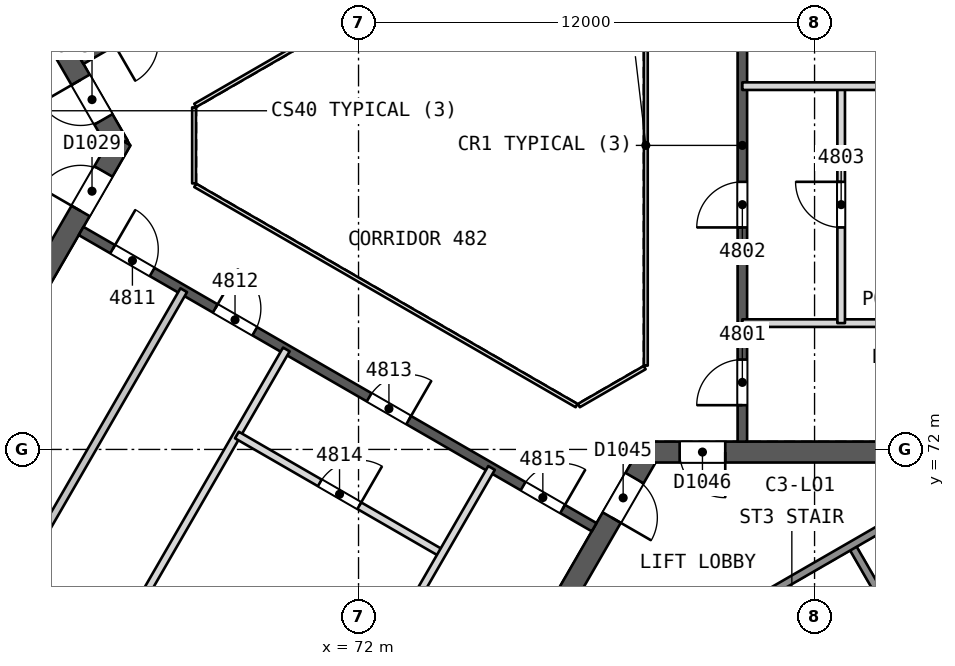
"""IFC4 building model, lengths in metres.
Left out: names, types, materials, properties, quantities, classifications, styles, units other than length and angle.
Written with IfcOpenShell. Run it as: python <this file> out.ifc"""

import sys

from ifc_helpers import new_model, si_unit, direction, frame, frame_2d, origin, place, context, subcontext, project, spatial, rectangle, extrude, element, fill, save


model = new_model("IFC4")
c1 = context("Model", 3, precision=1e-05, world=origin(), true_north=direction((0.0, 1.0)))
c2 = subcontext(c1, "Body", "Model", "MODEL_VIEW")
j1 = project(units=[si_unit("LENGTHUNIT", "METRE"), si_unit("PLANEANGLEUNIT", "RADIAN")], contexts=[c1])
p1 = place(None, origin())
s1 = spatial("IfcSite", under=j1, at=p1, CompositionType="ELEMENT")
p2 = place(p1, origin())
s2 = spatial("IfcBuilding", under=s1, at=p2, CompositionType="ELEMENT")
p3 = place(p2, frame((0.0, 0.0, 197.0)))
s3 = spatial("IfcBuildingStorey", under=s2, at=p3, CompositionType="ELEMENT", Elevation=197.0)
p4 = place(p3, frame((65.682, 80.0, 0.0), z_axis=(0.0, 0.0, 1.0), x_axis=(-0.500000202252, 0.866025287014, 0.0)))
e1 = element("IfcWall", 1, at=p4, inside=s3, PredefinedType="SHEAR", context=c2, shape_type="SweptSolid", body=[
    extrude(rectangle(XDim=10.221, YDim=0.55, at=frame_2d((5.111, 0.0))), origin(), (0.0, 0.0, 1.0), 4.4),
])
p5 = place(p4, frame((0.791, 0.0, 0.0)))
e2 = element("IfcOpeningElement", 2, at=p5, cuts=e1, PredefinedType="OPENING", context=c2, shape_type="SweptSolid", body=[
    extrude(rectangle(XDim=1.2, YDim=2.1, at=frame_2d((0.6, 1.05))), frame((0.0, 0.286, 0.0), z_axis=(0.0, -1.0, 0.0), x_axis=(1.0, 0.0, 0.0)), (0.0, 0.0, 1.0), 0.571),
])
p6 = place(p3, frame((60.709, 71.386, 0.0), z_axis=(0.0, 0.0, 1.0), x_axis=(0.500015938302, 0.866016201606, 0.0)))
e3 = element("IfcWall", 3, at=p6, inside=s3, PredefinedType="SHEAR", context=c2, shape_type="SweptSolid", body=[
    extrude(rectangle(XDim=10.105, YDim=0.55, at=frame_2d((5.053, 0.0))), origin(), (0.0, 0.0, 1.0), 4.4),
])
p7 = place(p6, frame((7.955, 0.0, 0.0)))
e4 = element("IfcOpeningElement", 4, at=p7, cuts=e3, PredefinedType="OPENING", context=c2, shape_type="SweptSolid", body=[
    extrude(rectangle(XDim=1.2, YDim=2.1, at=frame_2d((0.6, 1.05))), frame((0.0, 0.286, 0.0), z_axis=(0.0, -1.0, 0.0), x_axis=(1.0, 0.0, 0.0)), (0.0, 0.0, 1.0), 0.571),
])
p8 = place(p3, frame((79.659, 71.931, 0.0), z_axis=(0.0, 0.0, 1.0), x_axis=(-0.500000202252, -0.866025287014, 0.0)))
e5 = element("IfcWall", 5, at=p8, inside=s3, PredefinedType="SHEAR", context=c2, shape_type="SweptSolid", body=[
    extrude(rectangle(XDim=10.221, YDim=0.55, at=frame_2d((5.111, 0.0))), origin(), (0.0, 0.0, 1.0), 4.4),
])
p9 = place(p8, frame((0.791, 0.0, 0.0)))
e6 = element("IfcOpeningElement", 6, at=p9, cuts=e5, PredefinedType="OPENING", context=c2, shape_type="SweptSolid", body=[
    extrude(rectangle(XDim=1.2, YDim=2.1, at=frame_2d((0.6, 1.05))), frame((0.0, 0.286, 0.0), z_axis=(0.0, -1.0, 0.0), x_axis=(1.0, 0.0, 0.0)), (0.0, 0.0, 1.0), 0.571),
])
p10 = place(p3, frame((89.605, 71.931, 0.0), z_axis=(0.0, 0.0, 1.0), x_axis=(-1.0, 0.0, 0.0)))
e7 = element("IfcWall", 7, at=p10, inside=s3, PredefinedType="SHEAR", context=c2, shape_type="SweptSolid", body=[
    extrude(rectangle(XDim=10.105, YDim=0.55, at=frame_2d((5.052, 0.0))), origin(), (0.0, 0.0, 1.0), 4.4),
])
p11 = place(p10, frame((7.955, 0.0, 0.0)))
e8 = element("IfcOpeningElement", 8, at=p11, cuts=e7, PredefinedType="OPENING", context=c2, shape_type="SweptSolid", body=[
    extrude(rectangle(XDim=1.2, YDim=2.1, at=frame_2d((0.6, 1.05))), frame((0.0, 0.286, 0.0), z_axis=(0.0, -1.0, 0.0), x_axis=(1.0, 0.0, 0.0)), (0.0, 0.0, 1.0), 0.571),
])
p12 = place(p3, frame((82.1, 72.206, 0.0), z_axis=(0.0, 0.0, 1.0), x_axis=(0.0, 1.0, 0.0)))
e9 = element("IfcWall", 9, at=p12, inside=s3, PredefinedType="SHEAR", context=c2, shape_type="SweptSolid", body=[
    extrude(rectangle(XDim=15.588, YDim=0.25, at=frame_2d((7.794, 0.0))), origin(), (0.0, 0.0, 1.0), 3.95),
])
p13 = place(p12, frame((0.959, 0.0, 0.0)))
e10 = element("IfcOpeningElement", 10, at=p13, cuts=e9, PredefinedType="OPENING", context=c2, shape_type="SweptSolid", body=[
    extrude(rectangle(XDim=1.2, YDim=2.4, at=frame_2d((0.6, 1.2))), frame((0.0, 0.135, 0.0), z_axis=(0.0, -1.0, 0.0), x_axis=(1.0, 0.0, 0.0)), (0.0, 0.0, 1.0), 0.271),
])
p14 = place(p12, frame((5.635, 0.0, 0.0)))
e11 = element("IfcOpeningElement", 11, at=p14, cuts=e9, PredefinedType="OPENING", context=c2, shape_type="SweptSolid", body=[
    extrude(rectangle(XDim=1.2, YDim=2.4, at=frame_2d((0.6, 1.2))), frame((0.0, 0.135, 0.0), z_axis=(0.0, -1.0, 0.0), x_axis=(1.0, 0.0, 0.0)), (0.0, 0.0, 1.0), 0.271),
])
p15 = place(p12, frame((10.312, 0.0, 0.0)))
e12 = element("IfcOpeningElement", 12, at=p15, cuts=e9, PredefinedType="OPENING", context=c2, shape_type="SweptSolid", body=[
    extrude(rectangle(XDim=1.2, YDim=2.4, at=frame_2d((0.6, 1.2))), frame((0.0, 0.135, 0.0), z_axis=(0.0, -1.0, 0.0), x_axis=(1.0, 0.0, 0.0)), (0.0, 0.0, 1.0), 0.271),
])
p16 = place(p12, frame((13.43, 0.0, 0.0)))
e13 = element("IfcOpeningElement", 13, at=p16, cuts=e9, PredefinedType="OPENING", context=c2, shape_type="SweptSolid", body=[
    extrude(rectangle(XDim=1.2, YDim=2.4, at=frame_2d((0.6, 1.2))), frame((0.0, 0.135, 0.0), z_axis=(0.0, -1.0, 0.0), x_axis=(1.0, 0.0, 0.0)), (0.0, 0.0, 1.0), 0.271),
])
p17 = place(p3, frame((78.2, 90.046, 0.0), z_axis=(0.0, 0.0, 1.0), x_axis=(-0.866026492143, -0.499998114903, 0.0)))
e14 = element("IfcWall", 14, at=p17, inside=s3, PredefinedType="SHEAR", context=c2, shape_type="SweptSolid", body=[
    extrude(rectangle(XDim=15.588, YDim=0.25, at=frame_2d((7.794, 0.0))), origin(), (0.0, 0.0, 1.0), 3.95),
])
p18 = place(p17, frame((2.518, 0.0, 0.0)))
e15 = element("IfcOpeningElement", 15, at=p18, cuts=e14, PredefinedType="OPENING", context=c2, shape_type="SweptSolid", body=[
    extrude(rectangle(XDim=1.2, YDim=2.4, at=frame_2d((0.6, 1.2))), frame((0.0, 0.135, 0.0), z_axis=(0.0, -1.0, 0.0), x_axis=(1.0, 0.0, 0.0)), (0.0, 0.0, 1.0), 0.271),
])
p19 = place(p17, frame((7.194, 0.0, 0.0)))
e16 = element("IfcOpeningElement", 16, at=p19, cuts=e14, PredefinedType="OPENING", context=c2, shape_type="SweptSolid", body=[
    extrude(rectangle(XDim=1.2, YDim=2.4, at=frame_2d((0.6, 1.2))), frame((0.0, 0.135, 0.0), z_axis=(0.0, -1.0, 0.0), x_axis=(1.0, 0.0, 0.0)), (0.0, 0.0, 1.0), 0.271),
])
p20 = place(p17, frame((10.312, 0.0, 0.0)))
e17 = element("IfcOpeningElement", 17, at=p20, cuts=e14, PredefinedType="OPENING", context=c2, shape_type="SweptSolid", body=[
    extrude(rectangle(XDim=1.2, YDim=2.4, at=frame_2d((0.6, 1.2))), frame((0.0, 0.135, 0.0), z_axis=(0.0, -1.0, 0.0), x_axis=(1.0, 0.0, 0.0)), (0.0, 0.0, 1.0), 0.271),
])
p21 = place(p17, frame((13.43, 0.0, 0.0)))
e18 = element("IfcOpeningElement", 18, at=p21, cuts=e14, PredefinedType="OPENING", context=c2, shape_type="SweptSolid", body=[
    extrude(rectangle(XDim=1.2, YDim=2.4, at=frame_2d((0.6, 1.2))), frame((0.0, 0.135, 0.0), z_axis=(0.0, -1.0, 0.0), x_axis=(1.0, 0.0, 0.0)), (0.0, 0.0, 1.0), 0.271),
])
p22 = place(p3, frame((64.7, 77.748, 0.0), z_axis=(0.0, 0.0, 1.0), x_axis=(0.866026492143, -0.499998114903, 0.0)))
e19 = element("IfcWall", 19, at=p22, inside=s3, PredefinedType="SHEAR", context=c2, shape_type="SweptSolid", body=[
    extrude(rectangle(XDim=15.588, YDim=0.25, at=frame_2d((7.794, 0.0))), origin(), (0.0, 0.0, 1.0), 3.95),
])
p23 = place(p22, frame((0.959, 0.0, 0.0)))
e20 = element("IfcOpeningElement", 20, at=p23, cuts=e19, PredefinedType="OPENING", context=c2, shape_type="SweptSolid", body=[
    extrude(rectangle(XDim=1.2, YDim=2.4, at=frame_2d((0.6, 1.2))), frame((0.0, 0.135, 0.0), z_axis=(0.0, -1.0, 0.0), x_axis=(1.0, 0.0, 0.0)), (0.0, 0.0, 1.0), 0.271),
])
p24 = place(p22, frame((4.076, 0.0, 0.0)))
e21 = element("IfcOpeningElement", 21, at=p24, cuts=e19, PredefinedType="OPENING", context=c2, shape_type="SweptSolid", body=[
    extrude(rectangle(XDim=1.2, YDim=2.4, at=frame_2d((0.6, 1.2))), frame((0.0, 0.135, 0.0), z_axis=(0.0, -1.0, 0.0), x_axis=(1.0, 0.0, 0.0)), (0.0, 0.0, 1.0), 0.271),
])
p25 = place(p22, frame((8.753, 0.0, 0.0)))
e22 = element("IfcOpeningElement", 22, at=p25, cuts=e19, PredefinedType="OPENING", context=c2, shape_type="SweptSolid", body=[
    extrude(rectangle(XDim=1.2, YDim=2.4, at=frame_2d((0.6, 1.2))), frame((0.0, 0.135, 0.0), z_axis=(0.0, -1.0, 0.0), x_axis=(1.0, 0.0, 0.0)), (0.0, 0.0, 1.0), 0.271),
])
p26 = place(p22, frame((13.43, 0.0, 0.0)))
e23 = element("IfcOpeningElement", 23, at=p26, cuts=e19, PredefinedType="OPENING", context=c2, shape_type="SweptSolid", body=[
    extrude(rectangle(XDim=1.2, YDim=2.4, at=frame_2d((0.6, 1.2))), frame((0.0, 0.135, 0.0), z_axis=(0.0, -1.0, 0.0), x_axis=(1.0, 0.0, 0.0)), (0.0, 0.0, 1.0), 0.271),
])
p27 = place(p3, frame((92.979, 75.323, 0.0), z_axis=(0.0, 0.0, 1.0), x_axis=(-1.0, 0.0, 0.0)))
e24 = element("IfcWall", 24, at=p27, inside=s3, PredefinedType="PARTITIONING", context=c2, shape_type="SweptSolid", body=[
    extrude(rectangle(XDim=10.879, YDim=0.2, at=frame_2d((5.44, 0.0))), origin(), (0.0, 0.0, 1.0), 3.95),
])
p28 = place(p3, frame((84.7, 75.323, 0.0), z_axis=(0.0, 0.0, 1.0), x_axis=(0.0, 1.0, 0.0)))
e25 = element("IfcWall", 25, at=p28, inside=s3, PredefinedType="PARTITIONING", context=c2, shape_type="SweptSolid", body=[
    extrude(rectangle(XDim=6.235, YDim=0.2, at=frame_2d((3.118, 0.0))), origin(), (0.0, 0.0, 1.0), 3.95),
])
p29 = place(p28, frame((2.518, 0.0, 0.0)))
e26 = element("IfcOpeningElement", 26, at=p29, cuts=e25, PredefinedType="OPENING", context=c2, shape_type="SweptSolid", body=[
    extrude(rectangle(XDim=1.2, YDim=2.4, at=frame_2d((0.6, 1.2))), frame((0.0, 0.11, 0.0), z_axis=(0.0, -1.0, 0.0), x_axis=(1.0, 0.0, 0.0)), (0.0, 0.0, 1.0), 0.221),
])
for number, where, z_axis, x_axis in (
    (27, (92.979, 81.559, 0.0), (0.0, 0.0, 1.0), (-1.0, 0.0, 0.0)),
    (28, (61.96, 66.768, 0.0), (0.0, 0.0, 1.0), (0.5, 0.866, 0.0)),
):
    element("IfcWall", number, at=place(p3, frame(where, z_axis=z_axis, x_axis=x_axis)), inside=s3, PredefinedType="PARTITIONING", context=c2, shape_type="SweptSolid", body=[
        extrude(rectangle(XDim=10.879, YDim=0.2, at=frame_2d((5.44, 0.0))), origin(), (0.0, 0.0, 1.0), 3.95),
    ])
p30 = place(p3, frame((64.66, 65.209, 0.0), z_axis=(0.0, 0.0, 1.0), x_axis=(0.500015120401, 0.866016673841, 0.0)))
e29 = element("IfcWall", 29, at=p30, inside=s3, PredefinedType="PARTITIONING", context=c2, shape_type="SweptSolid", body=[
    extrude(rectangle(XDim=10.88, YDim=0.2, at=frame_2d((5.44, 0.0))), origin(), (0.0, 0.0, 1.0), 3.95),
])
p31 = place(p3, frame((68.8, 72.379, 0.0), z_axis=(0.0, 0.0, 1.0), x_axis=(0.866022576681, -0.500004896655, 0.0)))
e30 = element("IfcWall", 30, at=p31, inside=s3, PredefinedType="PARTITIONING", context=c2, shape_type="SweptSolid", body=[
    extrude(rectangle(XDim=6.235, YDim=0.2, at=frame_2d((3.118, 0.0))), origin(), (0.0, 0.0, 1.0), 3.95),
])
p32 = place(p31, frame((2.518, 0.0, 0.0)))
e31 = element("IfcOpeningElement", 31, at=p32, cuts=e30, PredefinedType="OPENING", context=c2, shape_type="SweptSolid", body=[
    extrude(rectangle(XDim=1.2, YDim=2.4, at=frame_2d((0.6, 1.2))), frame((0.0, 0.11, 0.0), z_axis=(0.0, -1.0, 0.0), x_axis=(1.0, 0.0, 0.0)), (0.0, 0.0, 1.0), 0.221),
])
p33 = place(p3, frame((70.06, 62.091, 0.0), z_axis=(0.0, 0.0, 1.0), x_axis=(0.49999829022, 0.866026390924, 0.0)))
e32 = element("IfcWall", 32, at=p33, inside=s3, PredefinedType="PARTITIONING", context=c2, shape_type="SweptSolid", body=[
    extrude(rectangle(XDim=10.879, YDim=0.2, at=frame_2d((5.44, 0.0))), origin(), (0.0, 0.0, 1.0), 3.95),
])
p34 = place(p3, frame((88.51, 51.267, 0.0), z_axis=(0.0, 0.0, 1.0), x_axis=(-0.866025243948, 0.500000276845, 0.0)))
e33 = element("IfcWall", 33, at=p34, inside=s3, PredefinedType="SOLIDWALL", context=c2, shape_type="SweptSolid", body=[
    extrude(rectangle(XDim=52.132, YDim=0.3, at=frame_2d((26.066, 0.0))), origin(), (0.0, 0.0, 1.0), 3.95),
])
p35 = place(p34, frame((42.139, 0.0, 0.9)))
e34 = element("IfcOpeningElement", 34, at=p35, cuts=e33, PredefinedType="OPENING", context=c2, shape_type="SweptSolid", body=[
    extrude(rectangle(XDim=1.8, YDim=1.5, at=frame_2d((0.9, 0.75))), frame((0.0, 0.161, 0.0), z_axis=(0.0, -1.0, 0.0), x_axis=(1.0, 0.0, 0.0)), (0.0, 0.0, 1.0), 0.321),
])
p36 = place(p34, frame((8.193, 0.0, 0.9)))
e35 = element("IfcOpeningElement", 35, at=p36, cuts=e33, PredefinedType="OPENING", context=c2, shape_type="SweptSolid", body=[
    extrude(rectangle(XDim=1.8, YDim=1.5, at=frame_2d((0.9, 0.75))), frame((0.0, 0.161, 0.0), z_axis=(0.0, -1.0, 0.0), x_axis=(1.0, 0.0, 0.0)), (0.0, 0.0, 1.0), 0.321),
])
p37 = place(p34, frame((3.713, 0.0, 0.6)))
e36 = element("IfcOpeningElement", 36, at=p37, cuts=e33, PredefinedType="OPENING", context=c2, shape_type="SweptSolid", body=[
    extrude(rectangle(XDim=3.0, YDim=2.4, at=frame_2d((1.5, 1.2))), frame((0.0, 0.161, 0.0), z_axis=(0.0, -1.0, 0.0), x_axis=(1.0, 0.0, 0.0)), (0.0, 0.0, 1.0), 0.321),
])
p38 = place(p34, frame((14.14, 0.0, 0.6)))
e37 = element("IfcOpeningElement", 37, at=p38, cuts=e33, PredefinedType="OPENING", context=c2, shape_type="SweptSolid", body=[
    extrude(rectangle(XDim=3.0, YDim=2.4, at=frame_2d((1.5, 1.2))), frame((0.0, 0.161, 0.0), z_axis=(0.0, -1.0, 0.0), x_axis=(1.0, 0.0, 0.0)), (0.0, 0.0, 1.0), 0.321),
])
p39 = place(p34, frame((24.566, 0.0, 0.6)))
e38 = element("IfcOpeningElement", 38, at=p39, cuts=e33, PredefinedType="OPENING", context=c2, shape_type="SweptSolid", body=[
    extrude(rectangle(XDim=3.0, YDim=2.4, at=frame_2d((1.5, 1.2))), frame((0.0, 0.161, 0.0), z_axis=(0.0, -1.0, 0.0), x_axis=(1.0, 0.0, 0.0)), (0.0, 0.0, 1.0), 0.321),
])
p40 = place(p34, frame((34.992, 0.0, 0.6)))
e39 = element("IfcOpeningElement", 39, at=p40, cuts=e33, PredefinedType="OPENING", context=c2, shape_type="SweptSolid", body=[
    extrude(rectangle(XDim=3.0, YDim=2.4, at=frame_2d((1.5, 1.2))), frame((0.0, 0.161, 0.0), z_axis=(0.0, -1.0, 0.0), x_axis=(1.0, 0.0, 0.0)), (0.0, 0.0, 1.0), 0.321),
])
p41 = place(p34, frame((45.419, 0.0, 0.6)))
e40 = element("IfcOpeningElement", 40, at=p41, cuts=e33, PredefinedType="OPENING", context=c2, shape_type="SweptSolid", body=[
    extrude(rectangle(XDim=3.0, YDim=2.4, at=frame_2d((1.5, 1.2))), frame((0.0, 0.161, 0.0), z_axis=(0.0, -1.0, 0.0), x_axis=(1.0, 0.0, 0.0)), (0.0, 0.0, 1.0), 0.321),
])
p42 = place(p3, frame((83.024, 68.352, 0.0), z_axis=(0.0, 0.0, 1.0), x_axis=(0.50000366821, -0.866023285932, 0.0)))
e41 = element("IfcWall", 41, at=p42, inside=s3, PredefinedType="SOLIDWALL", context=c2, shape_type="SweptSolid", body=[
    extrude(rectangle(XDim=2.48, YDim=0.2, at=frame_2d((1.24, 0.0))), origin(), (0.0, 0.0, 1.0), 3.95),
])
p43 = place(p3, frame((84.973, 69.477, 0.0), z_axis=(0.0, 0.0, 1.0), x_axis=(0.499996545922, -0.866027397988, 0.0)))
e42 = element("IfcWall", 42, at=p43, inside=s3, PredefinedType="SOLIDWALL", context=c2, shape_type="SweptSolid", body=[
    extrude(rectangle(XDim=2.75, YDim=0.2, at=frame_2d((1.375, 0.0))), origin(), (0.0, 0.0, 1.0), 3.95),
])
p44 = place(p3, frame((77.135, 64.952, 0.0), z_axis=(0.0, 0.0, 1.0), x_axis=(0.866031916153, 0.499988720078, 0.0)))
e43 = element("IfcWall", 43, at=p44, inside=s3, PredefinedType="SOLIDWALL", context=c2, shape_type="SweptSolid", body=[
    extrude(rectangle(XDim=11.35, YDim=0.2, at=frame_2d((5.675, 0.0))), origin(), (0.0, 0.0, 1.0), 3.95),
])
for number, where, z_axis, x_axis in (
    (44, (79.56, 74.206, 0.0), (0.0, 0.0, 1.0), (0.0, 1.0, 0.0)),
    (45, (77.738, 86.846, 0.0), (0.0, 0.0, 1.0), (-0.866, -0.5, 0.0)),
):
    element("IfcWall", number, at=place(p3, frame(where, z_axis=z_axis, x_axis=x_axis)), inside=s3, PredefinedType="PARTITIONING", context=c2, shape_type="SweptSolid", body=[
        extrude(rectangle(XDim=11.588, YDim=0.1, at=frame_2d((5.794, 0.0))), origin(), (0.0, 0.0, 1.0), 3.95),
    ])
p45 = place(p3, frame((67.672, 81.0, 0.0), z_axis=(0.0, 0.0, 1.0), x_axis=(0.0, -1.0, 0.0)))
e46 = element("IfcWall", 46, at=p45, inside=s3, PredefinedType="PARTITIONING", context=c2, shape_type="SweptSolid", body=[
    extrude(rectangle(XDim=2.0, YDim=0.1, at=frame_2d((1.0, 0.0))), origin(), (0.0, 0.0, 1.0), 3.95),
])
p46 = place(p3, frame((67.702, 78.948, 0.0), z_axis=(0.0, 0.0, 1.0), x_axis=(0.866026658274, -0.499997827154, 0.0)))
e47 = element("IfcWall", 47, at=p46, inside=s3, PredefinedType="PARTITIONING", context=c2, shape_type="SweptSolid", body=[
    extrude(rectangle(XDim=11.588, YDim=0.1, at=frame_2d((5.794, 0.0))), origin(), (0.0, 0.0, 1.0), 3.95),
])
p47 = place(p3, frame((77.798, 73.154, 0.0), z_axis=(0.0, 0.0, 1.0), x_axis=(0.866041268327, 0.499972520799, 0.0)))
e48 = element("IfcWall", 48, at=p47, inside=s3, PredefinedType="PARTITIONING", context=c2, shape_type="SweptSolid", body=[
    extrude(rectangle(XDim=2.0, YDim=0.1, at=frame_2d((1.0, 0.0))), origin(), (0.0, 0.0, 1.0), 3.95),
])
p48 = place(p13, origin())
e49 = element("IfcDoor", 49, at=p48, inside=s3, OperationType="SINGLE_SWING_LEFT", PredefinedType="NOTDEFINED", context=c2, shape_type="SweptSolid", body=[
    extrude(rectangle(XDim=1.2, YDim=2.4, at=frame_2d((0.6, 1.2))), frame((0.0, 0.025, 0.0), z_axis=(0.0, -1.0, 0.0), x_axis=(1.0, 0.0, 0.0)), (0.0, 0.0, 1.0), 0.05),
])
fill(e10, e49)
p49 = place(p14, origin())
e50 = element("IfcDoor", 50, at=p49, inside=s3, OperationType="SINGLE_SWING_LEFT", PredefinedType="NOTDEFINED", context=c2, shape_type="SweptSolid", body=[
    extrude(rectangle(XDim=1.2, YDim=2.4, at=frame_2d((0.6, 1.2))), frame((0.0, 0.025, 0.0), z_axis=(0.0, -1.0, 0.0), x_axis=(1.0, 0.0, 0.0)), (0.0, 0.0, 1.0), 0.05),
])
fill(e11, e50)
p50 = place(p29, origin())
e51 = element("IfcDoor", 51, at=p50, inside=s3, OperationType="SINGLE_SWING_RIGHT", PredefinedType="NOTDEFINED", context=c2, shape_type="SweptSolid", body=[
    extrude(rectangle(XDim=1.2, YDim=2.4, at=frame_2d((0.6, 1.2))), frame((0.0, 0.025, 0.0), z_axis=(0.0, -1.0, 0.0), x_axis=(1.0, 0.0, 0.0)), (0.0, 0.0, 1.0), 0.05),
])
fill(e26, e51)
p51 = place(p23, origin())
e52 = element("IfcDoor", 52, at=p51, inside=s3, OperationType="SINGLE_SWING_LEFT", PredefinedType="NOTDEFINED", context=c2, shape_type="SweptSolid", body=[
    extrude(rectangle(XDim=1.2, YDim=2.4, at=frame_2d((0.6, 1.2))), frame((0.0, 0.025, 0.0), z_axis=(0.0, -1.0, 0.0), x_axis=(1.0, 0.0, 0.0)), (0.0, 0.0, 1.0), 0.05),
])
fill(e20, e52)
p52 = place(p24, origin())
e53 = element("IfcDoor", 53, at=p52, inside=s3, OperationType="SINGLE_SWING_LEFT", PredefinedType="NOTDEFINED", context=c2, shape_type="SweptSolid", body=[
    extrude(rectangle(XDim=1.2, YDim=2.4, at=frame_2d((0.6, 1.2))), frame((0.0, 0.025, 0.0), z_axis=(0.0, -1.0, 0.0), x_axis=(1.0, 0.0, 0.0)), (0.0, 0.0, 1.0), 0.05),
])
fill(e21, e53)
p53 = place(p25, origin())
e54 = element("IfcDoor", 54, at=p53, inside=s3, OperationType="SINGLE_SWING_RIGHT", PredefinedType="NOTDEFINED", context=c2, shape_type="SweptSolid", body=[
    extrude(rectangle(XDim=1.2, YDim=2.4, at=frame_2d((0.6, 1.2))), frame((0.0, 0.025, 0.0), z_axis=(0.0, -1.0, 0.0), x_axis=(1.0, 0.0, 0.0)), (0.0, 0.0, 1.0), 0.05),
])
fill(e22, e54)
p54 = place(p32, origin())
e55 = element("IfcDoor", 55, at=p54, inside=s3, OperationType="SINGLE_SWING_RIGHT", PredefinedType="NOTDEFINED", context=c2, shape_type="SweptSolid", body=[
    extrude(rectangle(XDim=1.2, YDim=2.4, at=frame_2d((0.6, 1.2))), frame((0.0, 0.025, 0.0), z_axis=(0.0, -1.0, 0.0), x_axis=(1.0, 0.0, 0.0)), (0.0, 0.0, 1.0), 0.05),
])
fill(e31, e55)
p55 = place(p26, origin())
e56 = element("IfcDoor", 56, at=p55, inside=s3, OperationType="SINGLE_SWING_RIGHT", PredefinedType="NOTDEFINED", context=c2, shape_type="SweptSolid", body=[
    extrude(rectangle(XDim=1.2, YDim=2.4, at=frame_2d((0.6, 1.2))), frame((0.0, 0.025, 0.0), z_axis=(0.0, -1.0, 0.0), x_axis=(1.0, 0.0, 0.0)), (0.0, 0.0, 1.0), 0.05),
])
fill(e23, e56)
p56 = place(p5, origin())
e57 = element("IfcDoor", 57, at=p56, inside=s3, OperationType="SINGLE_SWING_RIGHT", PredefinedType="NOTDEFINED", context=c2, shape_type="SweptSolid", body=[
    extrude(rectangle(XDim=1.2, YDim=2.1, at=frame_2d((0.6, 1.05))), frame((0.0, 0.025, 0.0), z_axis=(0.0, -1.0, 0.0), x_axis=(1.0, 0.0, 0.0)), (0.0, 0.0, 1.0), 0.05),
])
fill(e2, e57)
p57 = place(p7, origin())
e58 = element("IfcDoor", 58, at=p57, inside=s3, OperationType="SINGLE_SWING_LEFT", PredefinedType="NOTDEFINED", context=c2, shape_type="SweptSolid", body=[
    extrude(rectangle(XDim=1.2, YDim=2.1, at=frame_2d((0.6, 1.05))), frame((0.0, 0.025, 0.0), z_axis=(0.0, -1.0, 0.0), x_axis=(1.0, 0.0, 0.0)), (0.0, 0.0, 1.0), 0.05),
])
fill(e4, e58)
p58 = place(p9, origin())
e59 = element("IfcDoor", 59, at=p58, inside=s3, OperationType="SINGLE_SWING_RIGHT", PredefinedType="NOTDEFINED", context=c2, shape_type="SweptSolid", body=[
    extrude(rectangle(XDim=1.2, YDim=2.1, at=frame_2d((0.6, 1.05))), frame((0.0, 0.025, 0.0), z_axis=(0.0, -1.0, 0.0), x_axis=(1.0, 0.0, 0.0)), (0.0, 0.0, 1.0), 0.05),
])
fill(e6, e59)
p59 = place(p11, origin())
e60 = element("IfcDoor", 60, at=p59, inside=s3, OperationType="SINGLE_SWING_LEFT", PredefinedType="NOTDEFINED", context=c2, shape_type="SweptSolid", body=[
    extrude(rectangle(XDim=1.2, YDim=2.1, at=frame_2d((0.6, 1.05))), frame((0.0, 0.025, 0.0), z_axis=(0.0, -1.0, 0.0), x_axis=(1.0, 0.0, 0.0)), (0.0, 0.0, 1.0), 0.05),
])
fill(e8, e60)
save(model, sys.argv[1])
